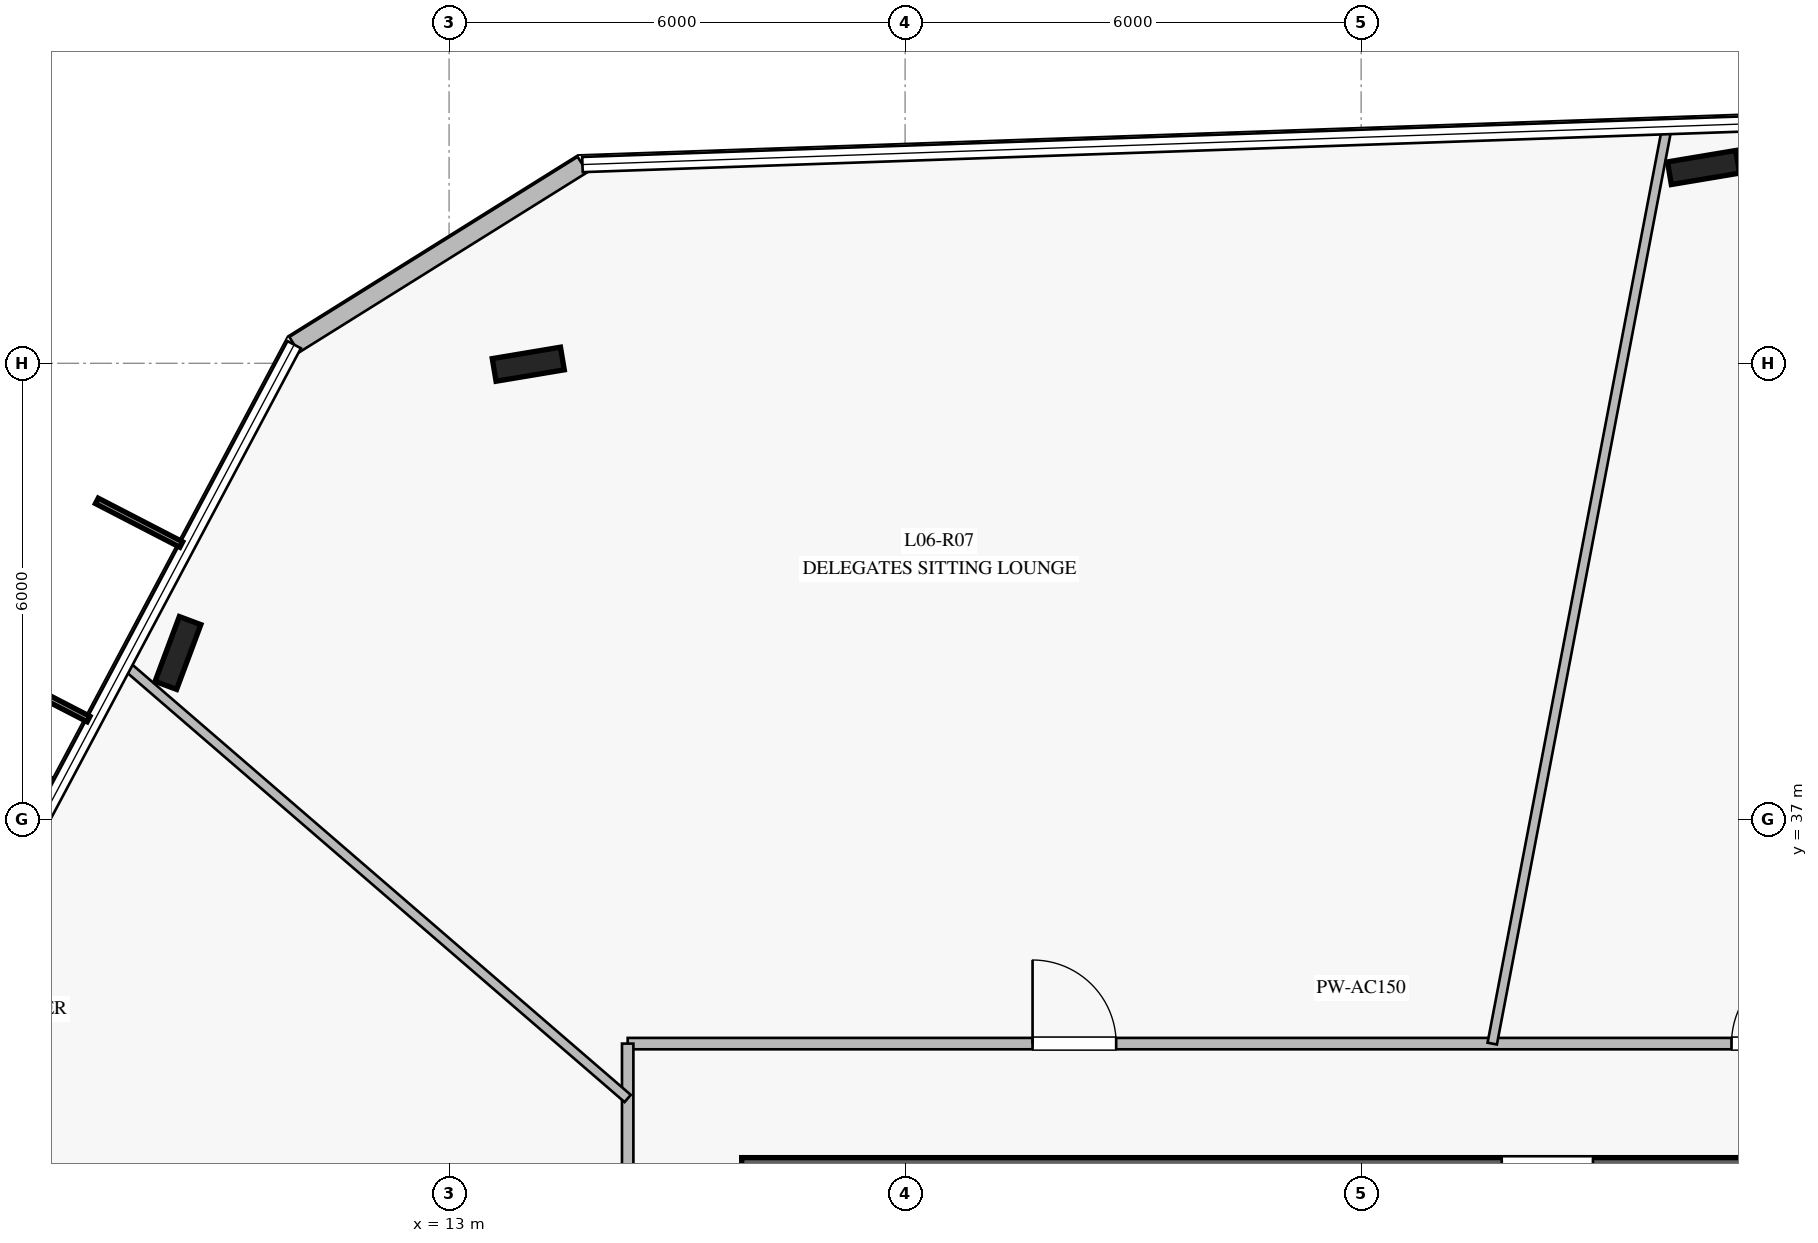
"""IFC4 building model, lengths in metres.
Left out: names, types, materials, properties, quantities, classifications, styles, units other than length and angle.
Written with IfcOpenShell. Run it as: python <this file> out.ifc"""

import sys

from ifc_helpers import new_model, si_unit, direction, frame, frame_2d, origin, origin_2d, place, context, subcontext, project, spatial, rectangle, i_section, extrude, element, fill, save


model = new_model("IFC4")
c1 = context("Model", 3, precision=1e-05, world=origin(), true_north=direction((0.0, 1.0)))
c2 = subcontext(c1, "Body", "Model", "MODEL_VIEW")
j1 = project(units=[si_unit("LENGTHUNIT", "METRE"), si_unit("PLANEANGLEUNIT", "RADIAN")], contexts=[c1])
p1 = place(None, origin())
s1 = spatial("IfcSite", under=j1, at=p1, CompositionType="ELEMENT")
p2 = place(p1, origin())
s2 = spatial("IfcBuilding", under=s1, at=p2, CompositionType="ELEMENT")
p3 = place(p2, frame((0.0, 0.0, 28.0)))
s3 = spatial("IfcBuildingStorey", under=s2, at=p3, CompositionType="ELEMENT", Elevation=28.0)
p4 = place(p3, frame((33.15, 32.2, 0.0), z_axis=(0.0, 0.0, 1.0), x_axis=(-1.0, 0.0, 0.0)))
e1 = element("IfcWall", 1, at=p4, inside=s3, PredefinedType="SHEAR", context=c2, shape_type="SweptSolid", body=[
    extrude(rectangle(XDim=16.3, YDim=0.7, at=frame_2d((8.15, 0.0))), origin(), (0.0, 0.0, 1.0), 3.76),
])
p5 = place(p4, frame((5.1, 0.0, 0.0)))
e2 = element("IfcOpeningElement", 2, at=p5, cuts=e1, PredefinedType="OPENING", context=c2, shape_type="SweptSolid", body=[
    extrude(rectangle(XDim=1.2, YDim=2.25, at=frame_2d((0.6, 1.125))), frame((0.0, 0.36, 0.0), z_axis=(0.0, -1.0, 0.0), x_axis=(1.0, 0.0, 0.0)), (0.0, 0.0, 1.0), 0.72),
])
for number, where, z_axis, x_axis in (
    (3, (17.2, 32.2, 0.0), (0.0, 0.0, 1.0), (1.0, 0.0, 0.0)),
    (4, (29.505, 45.576, 0.0), (0.0, 0.0, 1.0), (0.986, 0.165, 0.0)),
    (5, (14.042, 42.988, 0.0), (0.0, 0.0, 1.0), (0.986, 0.165, 0.0)),
    (6, (9.433, 39.189, 0.0), (0.0, 0.0, 1.0), (0.35, 0.937, 0.0)),
):
    element("IfcColumn", number, at=place(p3, frame(where, z_axis=z_axis, x_axis=x_axis)), inside=s3, PredefinedType="COLUMN", context=c2, shape_type="SweptSolid", body=[
        extrude(i_section(OverallWidth=0.302, OverallDepth=0.91, WebThickness=0.021, FlangeThickness=0.04, at=origin_2d()), origin(), (0.0, 0.0, 1.0), 4.0),
    ])
p6 = place(p3, frame((14.755, 45.615, 0.0), z_axis=(0.0, 0.0, 1.0), x_axis=(-0.848071896995, -0.529881173026, 0.0)))
e7 = element("IfcWall", 7, at=p6, inside=s3, PredefinedType="STANDARD", context=c2, shape_type="SweptSolid", body=[
    extrude(rectangle(XDim=4.472, YDim=0.24, at=frame_2d((2.236, 0.0))), origin(), (0.0, 0.0, 1.0), 3.76),
])
p7 = place(p3, frame((15.35, 34.05, 0.0), z_axis=(0.0, 0.0, 1.0), x_axis=(1.0, 0.0, 0.0)))
e8 = element("IfcWall", 8, at=p7, inside=s3, PredefinedType="PARTITIONING", context=c2, shape_type="SweptSolid", body=[
    extrude(rectangle(XDim=19.3, YDim=0.15, at=frame_2d((9.65, 0.0))), origin(), (0.0, 0.0, 1.0), 3.21),
])
p8 = place(p7, frame((14.523, 0.0, 0.0)))
e9 = element("IfcOpeningElement", 9, at=p8, cuts=e8, PredefinedType="OPENING", context=c2, shape_type="SweptSolid", body=[
    extrude(rectangle(XDim=1.1, YDim=2.2, at=frame_2d((0.55, 1.1))), frame((0.0, 0.085, 0.0), z_axis=(0.0, -1.0, 0.0), x_axis=(1.0, 0.0, 0.0)), (0.0, 0.0, 1.0), 0.17),
])
p9 = place(p7, frame((5.327, 0.0, 0.0)))
e10 = element("IfcOpeningElement", 10, at=p9, cuts=e8, PredefinedType="OPENING", context=c2, shape_type="SweptSolid", body=[
    extrude(rectangle(XDim=1.1, YDim=2.2, at=frame_2d((0.55, 1.1))), frame((0.0, 0.085, 0.0), z_axis=(0.0, -1.0, 0.0), x_axis=(1.0, 0.0, 0.0)), (0.0, 0.0, 1.0), 0.17),
])
p10 = place(p3, frame((15.35, 15.95, 0.0), z_axis=(0.0, 0.0, 1.0), x_axis=(0.0, 1.0, 0.0)))
e11 = element("IfcWall", 11, at=p10, inside=s3, PredefinedType="PARTITIONING", context=c2, shape_type="SweptSolid", body=[
    extrude(rectangle(XDim=18.1, YDim=0.15, at=frame_2d((9.05, 0.0))), origin(), (0.0, 0.0, 1.0), 3.21),
])
p11 = place(p10, frame((11.011, 0.0, 0.0)))
e12 = element("IfcOpeningElement", 12, at=p11, cuts=e11, PredefinedType="OPENING", context=c2, shape_type="SweptSolid", body=[
    extrude(rectangle(XDim=1.1, YDim=2.2, at=frame_2d((0.55, 1.1))), frame((0.0, 0.085, 0.0), z_axis=(0.0, -1.0, 0.0), x_axis=(1.0, 0.0, 0.0)), (0.0, 0.0, 1.0), 0.17),
])
p12 = place(p3, frame((26.725, 34.05, 0.0), z_axis=(0.0, 0.0, 1.0), x_axis=(0.187302392837, 0.982302302572, 0.0)))
e13 = element("IfcWall", 13, at=p12, inside=s3, PredefinedType="PARTITIONING", context=c2, shape_type="SweptSolid", body=[
    extrude(rectangle(XDim=12.263, YDim=0.125, at=frame_2d((6.131, 0.0))), origin(), (0.0, 0.0, 1.0), 3.06),
])
p13 = place(p3, frame((15.35, 33.328, 0.0), z_axis=(0.0, 0.0, 1.0), x_axis=(-0.757044964205, 0.65336277991, 0.0)))
e14 = element("IfcWall", 14, at=p13, inside=s3, PredefinedType="PARTITIONING", context=c2, shape_type="SweptSolid", body=[
    extrude(rectangle(XDim=8.729, YDim=0.125, at=frame_2d((4.364, 0.0))), origin(), (0.0, 0.0, 1.0), 3.06),
])
p14 = place(p8, origin())
e15 = element("IfcDoor", 15, at=p14, inside=s3, OperationType="SINGLE_SWING_RIGHT", PredefinedType="DOOR", context=c2, shape_type="SweptSolid", body=[
    extrude(rectangle(XDim=1.1, YDim=2.2, at=frame_2d((0.55, 1.1))), frame((0.0, 0.025, 0.0), z_axis=(0.0, -1.0, 0.0), x_axis=(1.0, 0.0, 0.0)), (0.0, 0.0, 1.0), 0.05),
])
fill(e9, e15)
p15 = place(p9, origin())
e16 = element("IfcDoor", 16, at=p15, inside=s3, OperationType="SINGLE_SWING_LEFT", PredefinedType="DOOR", context=c2, shape_type="SweptSolid", body=[
    extrude(rectangle(XDim=1.1, YDim=2.2, at=frame_2d((0.55, 1.1))), frame((0.0, 0.025, 0.0), z_axis=(0.0, -1.0, 0.0), x_axis=(1.0, 0.0, 0.0)), (0.0, 0.0, 1.0), 0.05),
])
fill(e10, e16)
save(model, sys.argv[1])
